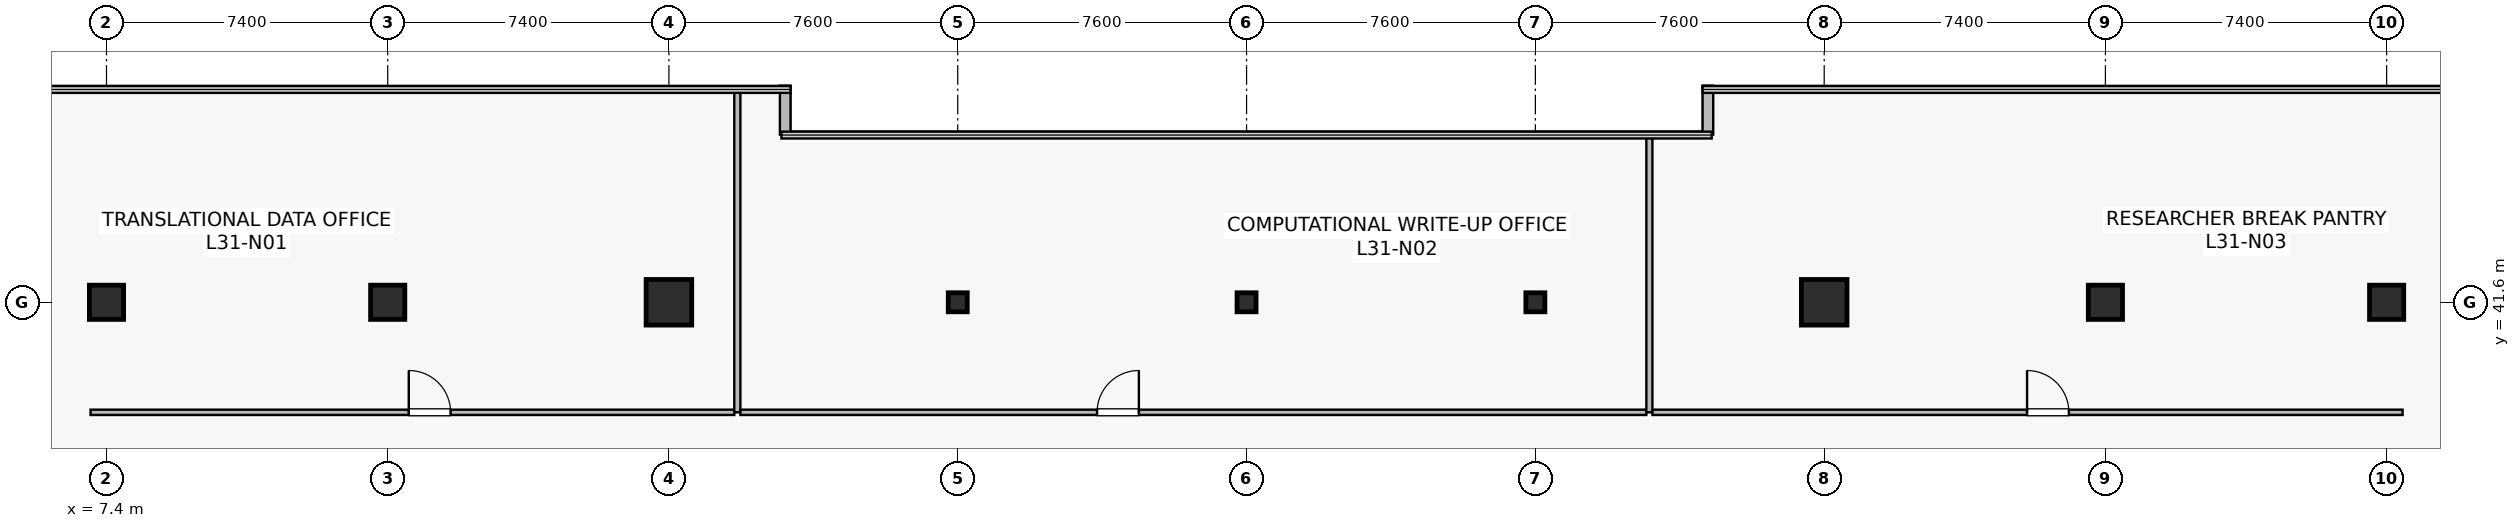
"""IFC4 building model, lengths in metres.
Left out: names, types, materials, properties, quantities, classifications, styles, units other than length and angle.
Written with IfcOpenShell. Run it as: python <this file> out.ifc"""

import sys

from ifc_helpers import new_model, si_unit, direction, frame, frame_2d, origin, origin_2d, place, context, subcontext, project, spatial, rectangle, hollow_rectangle, extrude, source, transform, mapped, element, fill, save


model = new_model("IFC4")
c1 = context("Model", 3, precision=1e-05, world=origin(), true_north=direction((0.0, 1.0)))
c2 = subcontext(c1, "Body", "Model", "MODEL_VIEW")
j1 = project(units=[si_unit("LENGTHUNIT", "METRE"), si_unit("PLANEANGLEUNIT", "RADIAN")], contexts=[c1])
p1 = place(None, origin())
s1 = spatial("IfcSite", under=j1, at=p1, CompositionType="ELEMENT")
p2 = place(p1, origin())
s2 = spatial("IfcBuilding", under=s1, at=p2, CompositionType="ELEMENT")
p3 = place(p2, frame((0.0, 0.0, 129.7)))
s3 = spatial("IfcBuildingStorey", under=s2, at=p3, CompositionType="ELEMENT", Elevation=129.7)
m1 = source(origin(), c2, "Body", "SweptSolid", [
    extrude(rectangle(XDim=0.9, YDim=0.9, at=origin_2d()), origin(), (0.0, 0.0, 1.0), 4.1),
])
p4 = place(p3, frame((14.8, 41.6, 0.0), z_axis=(0.0, 0.0, 1.0), x_axis=(1.0, 0.0, 0.0)))
e1 = element("IfcColumn", 1, at=p4, inside=s3, PredefinedType="COLUMN", context=c2, shape_type="MappedRepresentation", body=[
    mapped(m1, transform((0.0, 0.0, 0.0), scale=1.0)),
])
m2 = source(origin(), c2, "Body", "SweptSolid", [
    extrude(rectangle(XDim=1.2, YDim=1.2, at=origin_2d()), origin(), (0.0, 0.0, 1.0), 4.1),
])
for number, where, z_axis, x_axis in (
    (2, (22.2, 41.6, 0.0), (0.0, 0.0, 1.0), (1.0, 0.0, 0.0)),
    (3, (52.6, 41.6, 0.0), (0.0, 0.0, 1.0), (1.0, 0.0, 0.0)),
):
    element("IfcColumn", number, at=place(p3, frame(where, z_axis=z_axis, x_axis=x_axis)), inside=s3, PredefinedType="COLUMN", context=c2, shape_type="MappedRepresentation", body=[
        mapped(m2, transform((0.0, 0.0, 0.0), scale=1.0)),
    ])
for number, where, z_axis, x_axis in (
    (4, (60.0, 41.6, 0.0), (0.0, 0.0, 1.0), (1.0, 0.0, 0.0)),
    (5, (7.4, 41.6, 0.0), (0.0, 0.0, 1.0), (1.0, 0.0, 0.0)),
    (6, (67.4, 41.6, 0.0), (0.0, 0.0, 1.0), (1.0, 0.0, 0.0)),
):
    element("IfcColumn", number, at=place(p3, frame(where, z_axis=z_axis, x_axis=x_axis)), inside=s3, PredefinedType="COLUMN", context=c2, shape_type="MappedRepresentation", body=[
        mapped(m1, transform((0.0, 0.0, 0.0), scale=1.0)),
    ])
m3 = source(origin(), c2, "Body", "SweptSolid", [
    extrude(hollow_rectangle(XDim=0.5, YDim=0.5, WallThickness=0.022, at=origin_2d()), origin(), (0.0, 0.0, 1.0), 4.1),
])
for number, where, z_axis, x_axis in (
    (7, (29.8, 41.6, 0.0), (0.0, 0.0, 1.0), (1.0, 0.0, 0.0)),
    (8, (37.4, 41.6, 0.0), (0.0, 0.0, 1.0), (1.0, 0.0, 0.0)),
    (9, (45.0, 41.6, 0.0), (0.0, 0.0, 1.0), (1.0, 0.0, 0.0)),
):
    element("IfcColumn", number, at=place(p3, frame(where, z_axis=z_axis, x_axis=x_axis)), inside=s3, PredefinedType="COLUMN", context=c2, shape_type="MappedRepresentation", body=[
        mapped(m3, transform((0.0, 0.0, 0.0), scale=1.0)),
    ])
for number, where, z_axis, x_axis in (
    (10, (49.54, 47.3, 0.0), (0.0, 0.0, 1.0), (0.0, -1.0, 0.0)),
    (11, (25.26, 46.012, 0.0), (0.0, 0.0, 1.0), (0.0, 1.0, 0.0)),
):
    element("IfcWall", number, at=place(p3, frame(where, z_axis=z_axis, x_axis=x_axis)), inside=s3, PredefinedType="STANDARD", context=c2, shape_type="SweptSolid", body=[
        extrude(rectangle(XDim=1.288, YDim=0.28, at=frame_2d((0.644, 0.0))), origin(), (0.0, 0.0, 1.0), 3.79),
    ])
p5 = place(p3, frame((6.98, 38.705, 0.0), z_axis=(0.0, 0.0, 1.0), x_axis=(1.0, 0.0, 0.0)))
e12 = element("IfcWall", 12, at=p5, inside=s3, PredefinedType="PARTITIONING", context=c2, shape_type="SweptSolid", body=[
    extrude(rectangle(XDim=16.94, YDim=0.14, at=frame_2d((8.47, 0.0))), origin(), (0.0, 0.0, 1.0), 3.125),
])
p6 = place(p5, frame((8.374, 0.0, 0.0)))
e13 = element("IfcOpeningElement", 13, at=p6, cuts=e12, PredefinedType="OPENING", context=c2, shape_type="SweptSolid", body=[
    extrude(rectangle(XDim=1.1, YDim=2.18, at=frame_2d((0.55, 1.09))), frame((0.0, 0.08, 0.0), z_axis=(0.0, -1.0, 0.0), x_axis=(1.0, 0.0, 0.0)), (0.0, 0.0, 1.0), 0.16),
])
p7 = place(p3, frame((24.0, 38.705, 0.0), z_axis=(0.0, 0.0, 1.0), x_axis=(0.0, 1.0, 0.0)))
e14 = element("IfcWall", 14, at=p7, inside=s3, PredefinedType="PARTITIONING", context=c2, shape_type="SweptSolid", body=[
    extrude(rectangle(XDim=8.485, YDim=0.16, at=frame_2d((4.242, 0.0))), origin(), (0.0, 0.0, 1.0), 3.075),
])
p8 = place(p3, frame((24.08, 38.705, 0.0), z_axis=(0.0, 0.0, 1.0), x_axis=(1.0, 0.0, 0.0)))
e15 = element("IfcWall", 15, at=p8, inside=s3, PredefinedType="PARTITIONING", context=c2, shape_type="SweptSolid", body=[
    extrude(rectangle(XDim=23.84, YDim=0.14, at=frame_2d((11.92, 0.0))), origin(), (0.0, 0.0, 1.0), 3.125),
])
p9 = place(p8, frame((9.386, 0.0, 0.0)))
e16 = element("IfcOpeningElement", 16, at=p9, cuts=e15, PredefinedType="OPENING", context=c2, shape_type="SweptSolid", body=[
    extrude(rectangle(XDim=1.1, YDim=2.18, at=frame_2d((0.55, 1.09))), frame((0.0, 0.08, 0.0), z_axis=(0.0, -1.0, 0.0), x_axis=(1.0, 0.0, 0.0)), (0.0, 0.0, 1.0), 0.16),
])
p10 = place(p3, frame((48.0, 38.705, 0.0), z_axis=(0.0, 0.0, 1.0), x_axis=(0.0, 1.0, 0.0)))
e17 = element("IfcWall", 17, at=p10, inside=s3, PredefinedType="PARTITIONING", context=c2, shape_type="SweptSolid", body=[
    extrude(rectangle(XDim=7.285, YDim=0.16, at=frame_2d((3.643, 0.0))), origin(), (0.0, 0.0, 1.0), 3.075),
])
p11 = place(p3, frame((48.08, 38.705, 0.0), z_axis=(0.0, 0.0, 1.0), x_axis=(1.0, 0.0, 0.0)))
e18 = element("IfcWall", 18, at=p11, inside=s3, PredefinedType="PARTITIONING", context=c2, shape_type="SweptSolid", body=[
    extrude(rectangle(XDim=19.74, YDim=0.14, at=frame_2d((9.87, 0.0))), origin(), (0.0, 0.0, 1.0), 3.125),
])
p12 = place(p11, frame((9.858, 0.0, 0.0)))
e19 = element("IfcOpeningElement", 19, at=p12, cuts=e18, PredefinedType="OPENING", context=c2, shape_type="SweptSolid", body=[
    extrude(rectangle(XDim=1.1, YDim=2.18, at=frame_2d((0.55, 1.09))), frame((0.0, 0.08, 0.0), z_axis=(0.0, -1.0, 0.0), x_axis=(1.0, 0.0, 0.0)), (0.0, 0.0, 1.0), 0.16),
])
m4 = source(origin(), c2, "Body", "SweptSolid", [
    extrude(rectangle(XDim=1.1, YDim=2.18, at=frame_2d((0.55, 1.09))), frame((0.0, 0.025, 0.0), z_axis=(0.0, -1.0, 0.0), x_axis=(1.0, 0.0, 0.0)), (0.0, 0.0, 1.0), 0.05),
])
p13 = place(p6, origin())
e20 = element("IfcDoor", 20, at=p13, inside=s3, OperationType="SINGLE_SWING_LEFT", PredefinedType="DOOR", context=c2, shape_type="MappedRepresentation", body=[
    mapped(m4, transform((0.0, 0.0, 0.0), scale=1.0)),
])
fill(e13, e20)
p14 = place(p9, origin())
e21 = element("IfcDoor", 21, at=p14, inside=s3, OperationType="SINGLE_SWING_RIGHT", PredefinedType="DOOR", context=c2, shape_type="MappedRepresentation", body=[
    mapped(m4, transform((0.0, 0.0, 0.0), scale=1.0)),
])
fill(e16, e21)
p15 = place(p12, origin())
e22 = element("IfcDoor", 22, at=p15, inside=s3, OperationType="SINGLE_SWING_LEFT", PredefinedType="DOOR", context=c2, shape_type="MappedRepresentation", body=[
    mapped(m4, transform((0.0, 0.0, 0.0), scale=1.0)),
])
fill(e19, e22)
save(model, sys.argv[1])
